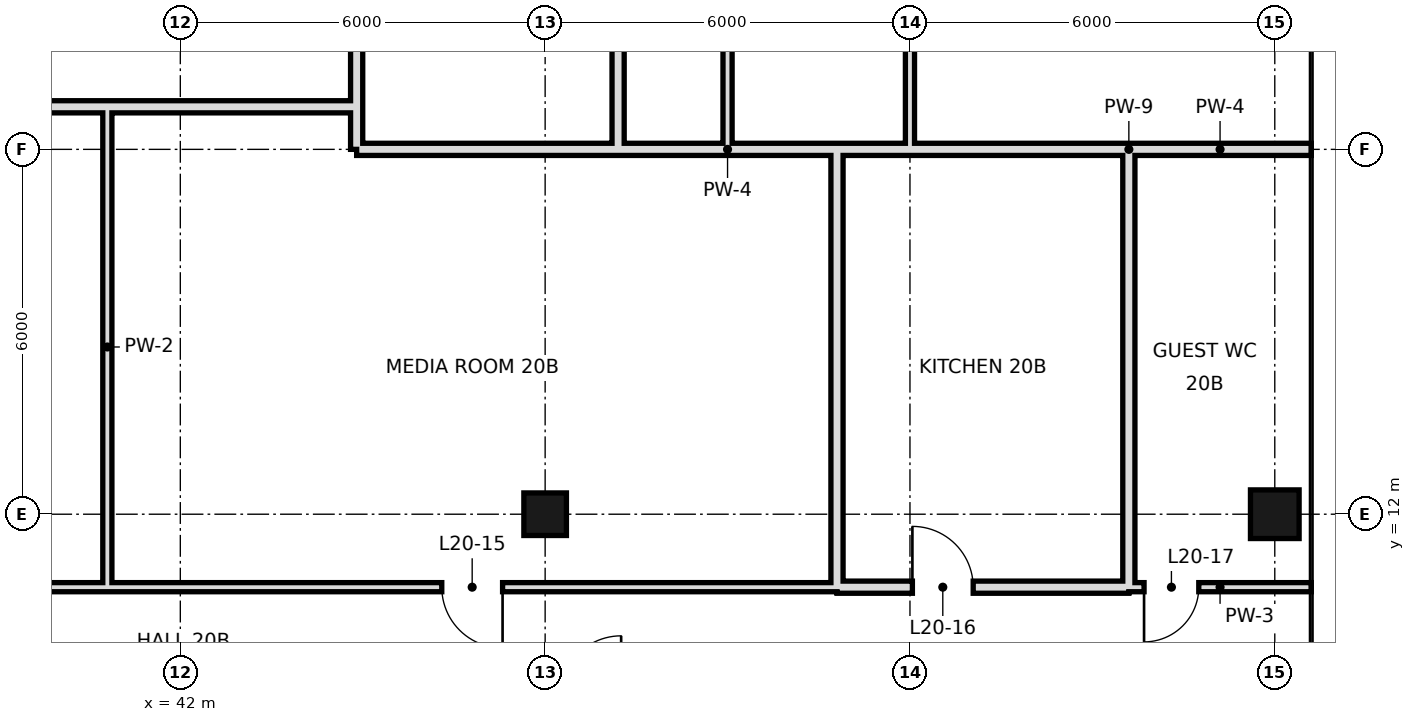
"""IFC4 building model, lengths in metres.
Left out: names, types, materials, properties, quantities, classifications, styles, units other than length and angle.
Written with IfcOpenShell. Run it as: python <this file> out.ifc"""

import sys

from ifc_helpers import new_model, si_unit, direction, frame, frame_2d, origin, origin_2d, place, context, subcontext, project, spatial, rectangle, hollow_rectangle, extrude, element, fill, save


model = new_model("IFC4")
c1 = context("Model", 3, precision=1e-05, world=origin(), true_north=direction((0.0, 1.0)))
c2 = subcontext(c1, "Body", "Model", "MODEL_VIEW")
j1 = project(units=[si_unit("LENGTHUNIT", "METRE"), si_unit("PLANEANGLEUNIT", "RADIAN")], contexts=[c1])
p1 = place(None, origin())
s1 = spatial("IfcSite", under=j1, at=p1, CompositionType="ELEMENT")
p2 = place(p1, origin())
s2 = spatial("IfcBuilding", under=s1, at=p2, CompositionType="ELEMENT")
p3 = place(p2, frame((0.0, 0.0, 96.2)))
s3 = spatial("IfcBuildingStorey", under=s2, at=p3, CompositionType="ELEMENT", Elevation=96.2)
p4 = place(p3, frame((48.0, 12.0, 0.0), z_axis=(0.0, 0.0, 1.0), x_axis=(1.0, 0.0, 0.0)))
e1 = element("IfcColumn", 1, at=p4, inside=s3, PredefinedType="COLUMN", context=c2, shape_type="SweptSolid", body=[
    extrude(hollow_rectangle(XDim=0.7, YDim=0.7, WallThickness=0.036, at=origin_2d()), origin(), (0.0, 0.0, 1.0), 3.6),
])
p5 = place(p3, frame((60.0, 12.0, -0.3), z_axis=(0.0, 0.0, 1.0), x_axis=(1.0, 0.0, 0.0)))
e2 = element("IfcColumn", 2, at=p5, inside=s3, PredefinedType="COLUMN", context=c2, shape_type="SweptSolid", body=[
    extrude(hollow_rectangle(XDim=0.8, YDim=0.8, WallThickness=0.04, at=origin_2d()), origin(), (0.0, 0.0, 1.0), 3.9),
])
p6 = place(p3, frame((40.8, 10.8, 0.0), z_axis=(0.0, 0.0, 1.0), x_axis=(0.0, 1.0, 0.0)))
e3 = element("IfcWall", 3, at=p6, inside=s3, PredefinedType="PARTITIONING", context=c2, shape_type="SweptSolid", body=[
    extrude(rectangle(XDim=7.9, YDim=0.15, at=frame_2d((3.95, 0.0))), origin(), (0.0, 0.0, 1.0), 3.42),
])
p7 = place(p3, frame((44.9, 18.0, 0.0), z_axis=(0.0, 0.0, 1.0), x_axis=(0.0, 1.0, 0.0)))
e4 = element("IfcWall", 4, at=p7, inside=s3, PredefinedType="SOLIDWALL", context=c2, shape_type="SweptSolid", body=[
    extrude(rectangle(XDim=4.2, YDim=0.2, at=frame_2d((2.1, 0.0))), origin(), (0.0, 0.0, 1.0), 2.97),
])
p8 = place(p3, frame((49.2, 18.0, 0.0), z_axis=(0.0, 0.0, 1.0), x_axis=(0.0, 1.0, 0.0)))
e5 = element("IfcWall", 5, at=p8, inside=s3, PredefinedType="SOLIDWALL", context=c2, shape_type="SweptSolid", body=[
    extrude(rectangle(XDim=4.2, YDim=0.2, at=frame_2d((2.1, 0.0))), origin(), (0.0, 0.0, 1.0), 2.72),
])
p9 = place(p8, frame((2.14, 0.0, 0.0)))
e6 = element("IfcOpeningElement", 6, at=p9, cuts=e5, PredefinedType="OPENING", context=c2, shape_type="SweptSolid", body=[
    extrude(rectangle(XDim=1.0, YDim=2.4, at=frame_2d((0.5, 1.2))), frame((0.0, 0.11, 0.0), z_axis=(0.0, -1.0, 0.0), x_axis=(1.0, 0.0, 0.0)), (0.0, 0.0, 1.0), 0.22),
])
p10 = place(p3, frame((51.0, 18.0, 0.0), z_axis=(0.0, 0.0, 1.0), x_axis=(0.0, 1.0, 0.0)))
e7 = element("IfcWall", 7, at=p10, inside=s3, PredefinedType="PARTITIONING", context=c2, shape_type="SweptSolid", body=[
    extrude(rectangle(XDim=18.0, YDim=0.15, at=frame_2d((9.0, 0.0))), origin(), (0.0, 0.0, 1.0), 3.42),
])
p11 = place(p10, frame((5.1, 0.0, 0.0)))
e8 = element("IfcOpeningElement", 8, at=p11, cuts=e7, PredefinedType="OPENING", context=c2, shape_type="SweptSolid", body=[
    extrude(rectangle(XDim=1.8, YDim=2.4, at=frame_2d((0.9, 1.2))), frame((0.0, 0.085, 0.0), z_axis=(0.0, -1.0, 0.0), x_axis=(1.0, 0.0, 0.0)), (0.0, 0.0, 1.0), 0.17),
])
p12 = place(p10, frame((13.36, 0.0, 0.0)))
e9 = element("IfcOpeningElement", 9, at=p12, cuts=e7, PredefinedType="OPENING", context=c2, shape_type="SweptSolid", body=[
    extrude(rectangle(XDim=1.8, YDim=2.4, at=frame_2d((0.9, 1.2))), frame((0.0, 0.085, 0.0), z_axis=(0.0, -1.0, 0.0), x_axis=(1.0, 0.0, 0.0)), (0.0, 0.0, 1.0), 0.17),
])
p13 = place(p3, frame((52.8, 10.8, 0.0), z_axis=(0.0, 0.0, 1.0), x_axis=(0.0, 1.0, 0.0)))
e10 = element("IfcWall", 10, at=p13, inside=s3, PredefinedType="SOLIDWALL", context=c2, shape_type="SweptSolid", body=[
    extrude(rectangle(XDim=7.2, YDim=0.2, at=frame_2d((3.6, 0.0))), origin(), (0.0, 0.0, 1.0), 2.72),
])
p14 = place(p3, frame((54.0, 18.0, 0.0), z_axis=(0.0, 0.0, 1.0), x_axis=(0.0, 1.0, 0.0)))
e11 = element("IfcWall", 11, at=p14, inside=s3, PredefinedType="PARTITIONING", context=c2, shape_type="SweptSolid", body=[
    extrude(rectangle(XDim=12.0, YDim=0.15, at=frame_2d((6.0, 0.0))), origin(), (0.0, 0.0, 1.0), 3.42),
])
p15 = place(p14, frame((3.16, 0.0, 0.0)))
e12 = element("IfcOpeningElement", 12, at=p15, cuts=e11, PredefinedType="OPENING", context=c2, shape_type="SweptSolid", body=[
    extrude(rectangle(XDim=1.8, YDim=2.4, at=frame_2d((0.9, 1.2))), frame((0.0, 0.085, 0.0), z_axis=(0.0, -1.0, 0.0), x_axis=(1.0, 0.0, 0.0)), (0.0, 0.0, 1.0), 0.17),
])
p16 = place(p3, frame((57.6, 10.8, 0.0), z_axis=(0.0, 0.0, 1.0), x_axis=(0.0, 1.0, 0.0)))
e13 = element("IfcWall", 13, at=p16, inside=s3, PredefinedType="SOLIDWALL", context=c2, shape_type="SweptSolid", body=[
    extrude(rectangle(XDim=7.2, YDim=0.2, at=frame_2d((3.6, 0.0))), origin(), (0.0, 0.0, 1.0), 2.72),
])
p17 = place(p3, frame((52.8, 10.8, 0.0), z_axis=(0.0, 0.0, 1.0), x_axis=(1.0, 0.0, 0.0)))
e14 = element("IfcWall", 14, at=p17, inside=s3, PredefinedType="SOLIDWALL", context=c2, shape_type="SweptSolid", body=[
    extrude(rectangle(XDim=4.8, YDim=0.2, at=frame_2d((2.4, 0.0))), origin(), (0.0, 0.0, 1.0), 3.42),
])
p18 = place(p17, frame((1.24, 0.0, 0.0)))
e15 = element("IfcOpeningElement", 15, at=p18, cuts=e14, PredefinedType="OPENING", context=c2, shape_type="SweptSolid", body=[
    extrude(rectangle(XDim=1.0, YDim=2.4, at=frame_2d((0.5, 1.2))), frame((0.0, 0.11, 0.0), z_axis=(0.0, -1.0, 0.0), x_axis=(1.0, 0.0, 0.0)), (0.0, 0.0, 1.0), 0.22),
])
p19 = place(p3, frame((12.6, 10.8, 0.0), z_axis=(0.0, 0.0, 1.0), x_axis=(1.0, 0.0, 0.0)))
e16 = element("IfcWall", 16, at=p19, inside=s3, PredefinedType="PARTITIONING", context=c2, shape_type="SweptSolid", body=[
    extrude(rectangle(XDim=40.2, YDim=0.15, at=frame_2d((20.1, 0.0))), origin(), (0.0, 0.0, 1.0), 3.42),
])
p20 = place(p19, frame((8.5, 0.0, 0.0)))
e17 = element("IfcOpeningElement", 17, at=p20, cuts=e16, PredefinedType="OPENING", context=c2, shape_type="SweptSolid", body=[
    extrude(rectangle(XDim=1.0, YDim=2.4, at=frame_2d((0.5, 1.2))), frame((0.0, 0.085, 0.0), z_axis=(0.0, -1.0, 0.0), x_axis=(1.0, 0.0, 0.0)), (0.0, 0.0, 1.0), 0.17),
])
p21 = place(p19, frame((1.78, 0.0, 0.0)))
e18 = element("IfcOpeningElement", 18, at=p21, cuts=e16, PredefinedType="OPENING", context=c2, shape_type="SweptSolid", body=[
    extrude(rectangle(XDim=1.0, YDim=2.4, at=frame_2d((0.5, 1.2))), frame((0.0, 0.085, 0.0), z_axis=(0.0, -1.0, 0.0), x_axis=(1.0, 0.0, 0.0)), (0.0, 0.0, 1.0), 0.17),
])
p22 = place(p19, frame((23.8, 0.0, 0.0)))
e19 = element("IfcOpeningElement", 19, at=p22, cuts=e16, PredefinedType="OPENING", context=c2, shape_type="SweptSolid", body=[
    extrude(rectangle(XDim=1.0, YDim=2.4, at=frame_2d((0.5, 1.2))), frame((0.0, 0.085, 0.0), z_axis=(0.0, -1.0, 0.0), x_axis=(1.0, 0.0, 0.0)), (0.0, 0.0, 1.0), 0.17),
])
p23 = place(p19, frame((16.3, 0.0, 0.0)))
e20 = element("IfcOpeningElement", 20, at=p23, cuts=e16, PredefinedType="OPENING", context=c2, shape_type="SweptSolid", body=[
    extrude(rectangle(XDim=1.0, YDim=2.4, at=frame_2d((0.5, 1.2))), frame((0.0, 0.085, 0.0), z_axis=(0.0, -1.0, 0.0), x_axis=(1.0, 0.0, 0.0)), (0.0, 0.0, 1.0), 0.17),
])
p24 = place(p19, frame((33.7, 0.0, 0.0)))
e21 = element("IfcOpeningElement", 21, at=p24, cuts=e16, PredefinedType="OPENING", context=c2, shape_type="SweptSolid", body=[
    extrude(rectangle(XDim=1.0, YDim=2.4, at=frame_2d((0.5, 1.2))), frame((0.0, 0.085, 0.0), z_axis=(0.0, -1.0, 0.0), x_axis=(1.0, 0.0, 0.0)), (0.0, 0.0, 1.0), 0.17),
])
p25 = place(p3, frame((57.6, 10.8, 0.0), z_axis=(0.0, 0.0, 1.0), x_axis=(1.0, 0.0, 0.0)))
e22 = element("IfcWall", 22, at=p25, inside=s3, PredefinedType="PARTITIONING", context=c2, shape_type="SweptSolid", body=[
    extrude(rectangle(XDim=3.0, YDim=0.15, at=frame_2d((1.5, 0.0))), origin(), (0.0, 0.0, 1.0), 3.42),
])
p26 = place(p25, frame((0.25, 0.0, 0.0)))
e23 = element("IfcOpeningElement", 23, at=p26, cuts=e22, PredefinedType="OPENING", context=c2, shape_type="SweptSolid", body=[
    extrude(rectangle(XDim=0.9, YDim=2.4, at=frame_2d((0.45, 1.2))), frame((0.0, 0.085, 0.0), z_axis=(0.0, -1.0, 0.0), x_axis=(1.0, 0.0, 0.0)), (0.0, 0.0, 1.0), 0.17),
])
p27 = place(p3, frame((44.9, 18.0, 0.0), z_axis=(0.0, 0.0, 1.0), x_axis=(1.0, 0.0, 0.0)))
e24 = element("IfcWall", 24, at=p27, inside=s3, PredefinedType="SOLIDWALL", context=c2, shape_type="SweptSolid", body=[
    extrude(rectangle(XDim=4.3, YDim=0.2, at=frame_2d((2.15, 0.0))), origin(), (0.0, 0.0, 1.0), 2.72),
])
p28 = place(p3, frame((52.8, 18.0, 0.0), z_axis=(0.0, 0.0, 1.0), x_axis=(1.0, 0.0, 0.0)))
e25 = element("IfcWall", 25, at=p28, inside=s3, PredefinedType="SOLIDWALL", context=c2, shape_type="SweptSolid", body=[
    extrude(rectangle(XDim=4.8, YDim=0.2, at=frame_2d((2.4, 0.0))), origin(), (0.0, 0.0, 1.0), 2.72),
])
p29 = place(p3, frame((49.2, 18.0, 0.0), z_axis=(0.0, 0.0, 1.0), x_axis=(1.0, 0.0, 0.0)))
e26 = element("IfcWall", 26, at=p29, inside=s3, PredefinedType="SOLIDWALL", context=c2, shape_type="SweptSolid", body=[
    extrude(rectangle(XDim=3.6, YDim=0.2, at=frame_2d((1.8, 0.0))), origin(), (0.0, 0.0, 1.0), 2.72),
])
p30 = place(p3, frame((57.6, 18.0, 0.0), z_axis=(0.0, 0.0, 1.0), x_axis=(1.0, 0.0, 0.0)))
e27 = element("IfcWall", 27, at=p30, inside=s3, PredefinedType="SOLIDWALL", context=c2, shape_type="SweptSolid", body=[
    extrude(rectangle(XDim=3.0, YDim=0.2, at=frame_2d((1.5, 0.0))), origin(), (0.0, 0.0, 1.0), 2.72),
])
p31 = place(p3, frame((12.6, 18.7, 0.0), z_axis=(0.0, 0.0, 1.0), x_axis=(1.0, 0.0, 0.0)))
e28 = element("IfcWall", 28, at=p31, inside=s3, PredefinedType="SOLIDWALL", context=c2, shape_type="SweptSolid", body=[
    extrude(rectangle(XDim=32.3, YDim=0.2, at=frame_2d((16.15, 0.0))), origin(), (0.0, 0.0, 1.0), 2.72),
])
p32 = place(p31, frame((7.78, 0.0, 0.0)))
e29 = element("IfcOpeningElement", 29, at=p32, cuts=e28, PredefinedType="OPENING", context=c2, shape_type="SweptSolid", body=[
    extrude(rectangle(XDim=1.2, YDim=2.4, at=frame_2d((0.6, 1.2))), frame((0.0, 0.11, 0.0), z_axis=(0.0, -1.0, 0.0), x_axis=(1.0, 0.0, 0.0)), (0.0, 0.0, 1.0), 0.22),
])
p33 = place(p31, frame((24.6, 0.0, 0.0)))
e30 = element("IfcOpeningElement", 30, at=p33, cuts=e28, PredefinedType="OPENING", context=c2, shape_type="SweptSolid", body=[
    extrude(rectangle(XDim=1.2, YDim=2.4, at=frame_2d((0.6, 1.2))), frame((0.0, 0.11, 0.0), z_axis=(0.0, -1.0, 0.0), x_axis=(1.0, 0.0, 0.0)), (0.0, 0.0, 1.0), 0.22),
])
p34 = place(p24, origin())
e31 = element("IfcDoor", 31, at=p34, inside=s3, OperationType="SINGLE_SWING_RIGHT", PredefinedType="DOOR", context=c2, shape_type="SweptSolid", body=[
    extrude(rectangle(XDim=1.0, YDim=2.4, at=frame_2d((0.5, 1.2))), frame((0.0, 0.025, 0.0), z_axis=(0.0, -1.0, 0.0), x_axis=(1.0, 0.0, 0.0)), (0.0, 0.0, 1.0), 0.05),
])
fill(e21, e31)
p35 = place(p18, origin())
e32 = element("IfcDoor", 32, at=p35, inside=s3, OperationType="SINGLE_SWING_LEFT", PredefinedType="DOOR", context=c2, shape_type="SweptSolid", body=[
    extrude(rectangle(XDim=1.0, YDim=2.4, at=frame_2d((0.5, 1.2))), frame((0.0, 0.025, 0.0), z_axis=(0.0, -1.0, 0.0), x_axis=(1.0, 0.0, 0.0)), (0.0, 0.0, 1.0), 0.05),
])
fill(e15, e32)
p36 = place(p26, frame((0.9, 0.0, 0.0), z_axis=(0.0, 0.0, 1.0), x_axis=(-1.0, 0.0, 0.0)))
e33 = element("IfcDoor", 33, at=p36, inside=s3, OperationType="SINGLE_SWING_RIGHT", PredefinedType="DOOR", context=c2, shape_type="SweptSolid", body=[
    extrude(rectangle(XDim=0.9, YDim=2.4, at=frame_2d((0.45, 1.2))), frame((0.0, 0.025, 0.0), z_axis=(0.0, -1.0, 0.0), x_axis=(1.0, 0.0, 0.0)), (0.0, 0.0, 1.0), 0.05),
])
fill(e23, e33)
save(model, sys.argv[1])
